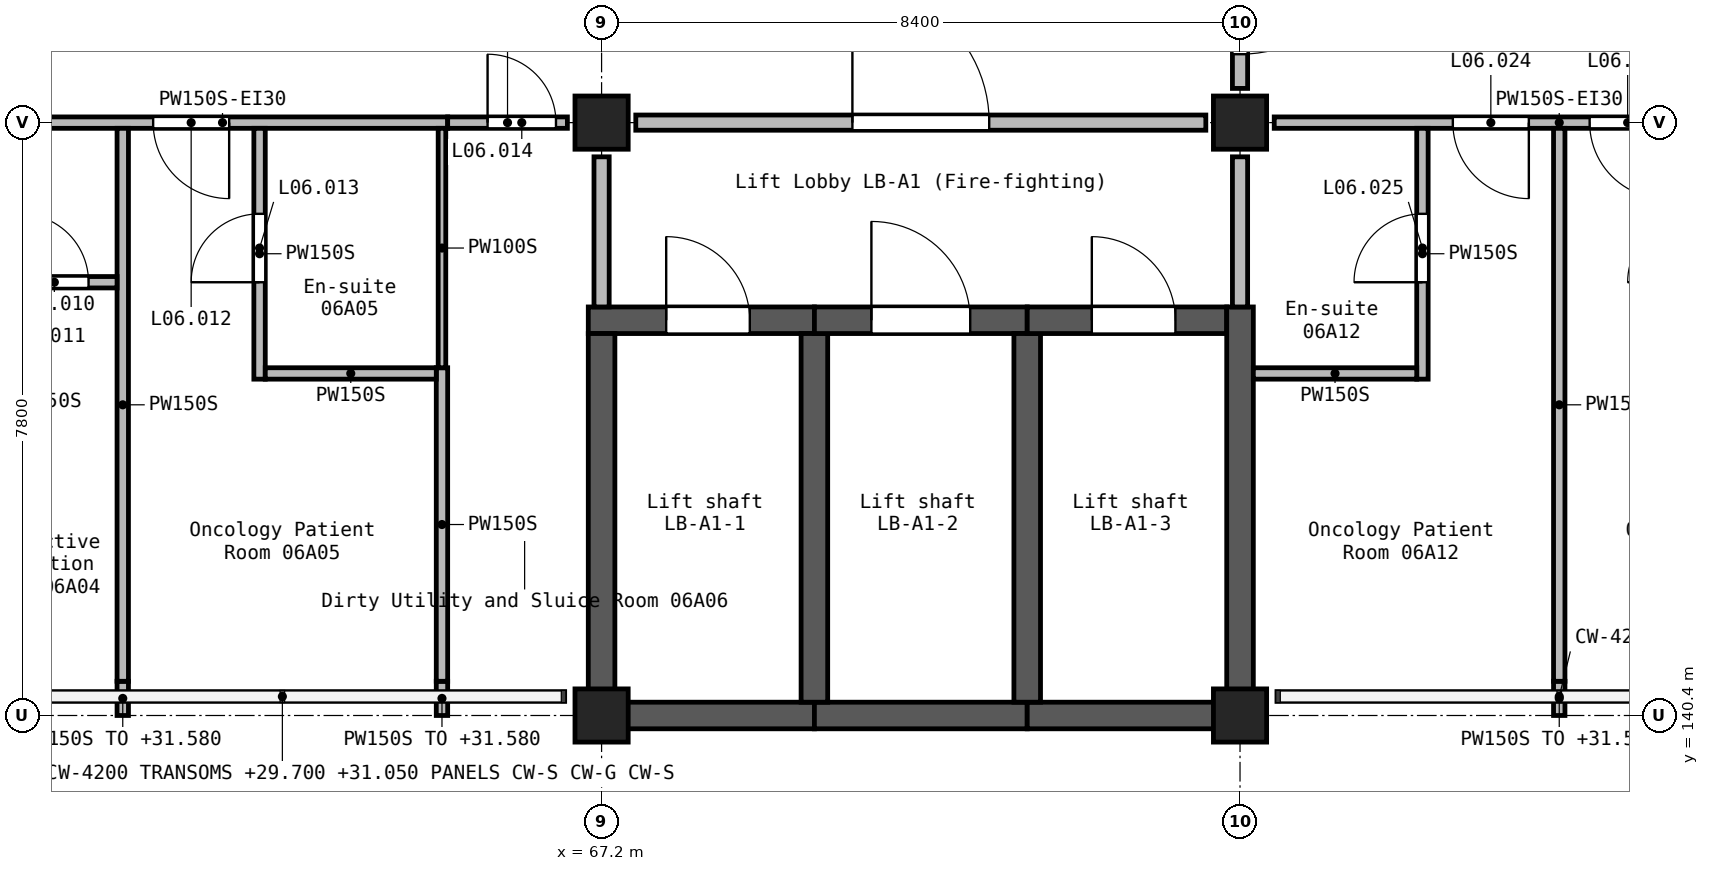
"""IFC4 building model, lengths in metres.
Left out: names, types, materials, properties, quantities, classifications, styles, units other than length and angle.
Written with IfcOpenShell. Run it as: python <this file> out.ifc"""

import sys

from ifc_helpers import new_model, si_unit, direction, frame, frame_2d, origin, origin_2d, place, context, subcontext, project, spatial, rectangle, extrude, element, fill, save


model = new_model("IFC4")
c1 = context("Model", 3, precision=1e-05, world=origin(), true_north=direction((0.0, 1.0)))
c2 = subcontext(c1, "Body", "Model", "MODEL_VIEW")
j1 = project(units=[si_unit("LENGTHUNIT", "METRE"), si_unit("PLANEANGLEUNIT", "RADIAN")], contexts=[c1])
p1 = place(None, origin())
s1 = spatial("IfcSite", under=j1, at=p1, CompositionType="ELEMENT")
p2 = place(p1, origin())
s2 = spatial("IfcBuilding", under=s1, at=p2, CompositionType="ELEMENT")
p3 = place(p2, frame((0.0, 0.0, 28.8)))
s3 = spatial("IfcBuildingStorey", under=s2, at=p3, CompositionType="ELEMENT", Elevation=28.8)
for number, where, z_axis, x_axis in (
    (1, (67.2, 140.4, 0.0), (0.0, 0.0, 1.0), (1.0, 0.0, 0.0)),
    (2, (67.2, 148.2, 0.0), (0.0, 0.0, 1.0), (1.0, 0.0, 0.0)),
    (3, (75.6, 140.4, 0.0), (0.0, 0.0, 1.0), (1.0, 0.0, 0.0)),
    (4, (75.6, 148.2, 0.0), (0.0, 0.0, 1.0), (1.0, 0.0, 0.0)),
):
    element("IfcColumn", number, at=place(p3, frame(where, z_axis=z_axis, x_axis=x_axis)), inside=s3, PredefinedType="COLUMN", context=c2, shape_type="SweptSolid", body=[
        extrude(rectangle(XDim=0.7, YDim=0.7, at=origin_2d()), origin(), (0.0, 0.0, 1.0), 3.9),
    ])
p4 = place(p3, frame((67.025, 145.6, 0.0), z_axis=(0.0, 0.0, 1.0), x_axis=(1.0, 0.0, 0.0)))
e5 = element("IfcWall", 5, at=p4, inside=s3, PredefinedType="SHEAR", context=c2, shape_type="SweptSolid", body=[
    extrude(rectangle(XDim=2.975, YDim=0.35, at=frame_2d((1.488, 0.0))), origin(), (0.0, 0.0, 1.0), 3.9),
])
p5 = place(p4, frame((1.025, 0.0, 0.0)))
e6 = element("IfcOpeningElement", 6, at=p5, cuts=e5, PredefinedType="OPENING", context=c2, shape_type="SweptSolid", body=[
    extrude(rectangle(XDim=1.1, YDim=2.1, at=frame_2d((0.55, 1.05))), frame((0.0, 0.185, 0.0), z_axis=(0.0, -1.0, 0.0), x_axis=(1.0, 0.0, 0.0)), (0.0, 0.0, 1.0), 0.37),
])
p6 = place(p3, frame((67.2, 140.225, 0.0), z_axis=(0.0, 0.0, 1.0), x_axis=(0.0, 1.0, 0.0)))
e7 = element("IfcWall", 7, at=p6, inside=s3, PredefinedType="SHEAR", context=c2, shape_type="SweptSolid", body=[
    extrude(rectangle(XDim=5.2, YDim=0.35, at=frame_2d((2.6, 0.0))), origin(), (0.0, 0.0, 1.0), 3.9),
])
p7 = place(p3, frame((67.375, 140.4, 0.0), z_axis=(0.0, 0.0, 1.0), x_axis=(1.0, 0.0, 0.0)))
e8 = element("IfcWall", 8, at=p7, inside=s3, PredefinedType="SHEAR", context=c2, shape_type="SweptSolid", body=[
    extrude(rectangle(XDim=2.625, YDim=0.35, at=frame_2d((1.312, 0.0))), origin(), (0.0, 0.0, 1.0), 3.9),
])
p8 = place(p3, frame((70.0, 140.4, 0.0), z_axis=(0.0, 0.0, 1.0), x_axis=(1.0, 0.0, 0.0)))
e9 = element("IfcWall", 9, at=p8, inside=s3, PredefinedType="SHEAR", context=c2, shape_type="SweptSolid", body=[
    extrude(rectangle(XDim=2.8, YDim=0.35, at=frame_2d((1.4, 0.0))), origin(), (0.0, 0.0, 1.0), 3.9),
])
p9 = place(p3, frame((70.0, 140.575, 0.0), z_axis=(0.0, 0.0, 1.0), x_axis=(0.0, 1.0, 0.0)))
e10 = element("IfcWall", 10, at=p9, inside=s3, PredefinedType="SHEAR", context=c2, shape_type="SweptSolid", body=[
    extrude(rectangle(XDim=4.85, YDim=0.35, at=frame_2d((2.425, 0.0))), origin(), (0.0, 0.0, 1.0), 3.9),
])
p10 = place(p3, frame((70.0, 145.6, 0.0), z_axis=(0.0, 0.0, 1.0), x_axis=(1.0, 0.0, 0.0)))
e11 = element("IfcWall", 11, at=p10, inside=s3, PredefinedType="SHEAR", context=c2, shape_type="SweptSolid", body=[
    extrude(rectangle(XDim=2.8, YDim=0.35, at=frame_2d((1.4, 0.0))), origin(), (0.0, 0.0, 1.0), 3.9),
])
p11 = place(p10, frame((0.75, 0.0, 0.0)))
e12 = element("IfcOpeningElement", 12, at=p11, cuts=e11, PredefinedType="OPENING", context=c2, shape_type="SweptSolid", body=[
    extrude(rectangle(XDim=1.3, YDim=2.1, at=frame_2d((0.65, 1.05))), frame((0.0, 0.185, 0.0), z_axis=(0.0, -1.0, 0.0), x_axis=(1.0, 0.0, 0.0)), (0.0, 0.0, 1.0), 0.37),
])
p12 = place(p3, frame((72.8, 140.4, 0.0), z_axis=(0.0, 0.0, 1.0), x_axis=(1.0, 0.0, 0.0)))
e13 = element("IfcWall", 13, at=p12, inside=s3, PredefinedType="SHEAR", context=c2, shape_type="SweptSolid", body=[
    extrude(rectangle(XDim=2.625, YDim=0.35, at=frame_2d((1.312, 0.0))), origin(), (0.0, 0.0, 1.0), 3.9),
])
p13 = place(p3, frame((72.8, 140.575, 0.0), z_axis=(0.0, 0.0, 1.0), x_axis=(0.0, 1.0, 0.0)))
e14 = element("IfcWall", 14, at=p13, inside=s3, PredefinedType="SHEAR", context=c2, shape_type="SweptSolid", body=[
    extrude(rectangle(XDim=4.85, YDim=0.35, at=frame_2d((2.425, 0.0))), origin(), (0.0, 0.0, 1.0), 3.9),
])
p14 = place(p3, frame((72.8, 145.6, 0.0), z_axis=(0.0, 0.0, 1.0), x_axis=(1.0, 0.0, 0.0)))
e15 = element("IfcWall", 15, at=p14, inside=s3, PredefinedType="SHEAR", context=c2, shape_type="SweptSolid", body=[
    extrude(rectangle(XDim=2.625, YDim=0.35, at=frame_2d((1.312, 0.0))), origin(), (0.0, 0.0, 1.0), 3.9),
])
p15 = place(p14, frame((0.85, 0.0, 0.0)))
e16 = element("IfcOpeningElement", 16, at=p15, cuts=e15, PredefinedType="OPENING", context=c2, shape_type="SweptSolid", body=[
    extrude(rectangle(XDim=1.1, YDim=2.1, at=frame_2d((0.55, 1.05))), frame((0.0, 0.185, 0.0), z_axis=(0.0, -1.0, 0.0), x_axis=(1.0, 0.0, 0.0)), (0.0, 0.0, 1.0), 0.37),
])
p16 = place(p3, frame((75.6, 140.225, 0.0), z_axis=(0.0, 0.0, 1.0), x_axis=(0.0, 1.0, 0.0)))
e17 = element("IfcWall", 17, at=p16, inside=s3, PredefinedType="SHEAR", context=c2, shape_type="SweptSolid", body=[
    extrude(rectangle(XDim=5.55, YDim=0.35, at=frame_2d((2.775, 0.0))), origin(), (0.0, 0.0, 1.0), 3.9),
])
p17 = place(p3, frame((75.6, 151.35, 0.0), z_axis=(0.0, 0.0, 1.0), x_axis=(0.0, -1.0, 0.0)))
e18 = element("IfcWall", 18, at=p17, inside=s3, PredefinedType="SOLIDWALL", context=c2, shape_type="SweptSolid", body=[
    extrude(rectangle(XDim=2.7, YDim=0.2, at=frame_2d((1.35, 0.0))), origin(), (0.0, 0.0, 1.0), 3.6),
])
p18 = place(p17, frame((0.45, 0.0, 0.0)))
e19 = element("IfcOpeningElement", 19, at=p18, cuts=e18, PredefinedType="OPENING", context=c2, shape_type="SweptSolid", body=[
    extrude(rectangle(XDim=1.8, YDim=2.1, at=frame_2d((0.9, 1.05))), frame((0.0, 0.11, 0.0), z_axis=(0.0, -1.0, 0.0), x_axis=(1.0, 0.0, 0.0)), (0.0, 0.0, 1.0), 0.22),
])
p19 = place(p3, frame((75.6, 147.75, 0.0), z_axis=(0.0, 0.0, 1.0), x_axis=(0.0, -1.0, 0.0)))
e20 = element("IfcWall", 20, at=p19, inside=s3, PredefinedType="SOLIDWALL", context=c2, shape_type="SweptSolid", body=[
    extrude(rectangle(XDim=1.975, YDim=0.2, at=frame_2d((0.988, 0.0))), origin(), (0.0, 0.0, 1.0), 3.6),
])
p20 = place(p3, frame((67.65, 148.2, 0.0), z_axis=(0.0, 0.0, 1.0), x_axis=(1.0, 0.0, 0.0)))
e21 = element("IfcWall", 21, at=p20, inside=s3, PredefinedType="SOLIDWALL", context=c2, shape_type="SweptSolid", body=[
    extrude(rectangle(XDim=7.5, YDim=0.2, at=frame_2d((3.75, 0.0))), origin(), (0.0, 0.0, 1.0), 3.6),
])
p21 = place(p20, frame((2.85, 0.0, 0.0)))
e22 = element("IfcOpeningElement", 22, at=p21, cuts=e21, PredefinedType="OPENING", context=c2, shape_type="SweptSolid", body=[
    extrude(rectangle(XDim=1.8, YDim=2.1, at=frame_2d((0.9, 1.05))), frame((0.0, 0.11, 0.0), z_axis=(0.0, -1.0, 0.0), x_axis=(1.0, 0.0, 0.0)), (0.0, 0.0, 1.0), 0.22),
])
p22 = place(p3, frame((67.2, 145.775, 0.0), z_axis=(0.0, 0.0, 1.0), x_axis=(0.0, 1.0, 0.0)))
e23 = element("IfcWall", 23, at=p22, inside=s3, PredefinedType="SOLIDWALL", context=c2, shape_type="SweptSolid", body=[
    extrude(rectangle(XDim=1.975, YDim=0.2, at=frame_2d((0.988, 0.0))), origin(), (0.0, 0.0, 1.0), 3.6),
])
p23 = place(p3, frame((83.55, 148.2, 0.0), z_axis=(0.0, 0.0, 1.0), x_axis=(-1.0, 0.0, 0.0)))
e24 = element("IfcWall", 24, at=p23, inside=s3, PredefinedType="PARTITIONING", context=c2, shape_type="SweptSolid", body=[
    extrude(rectangle(XDim=7.5, YDim=0.15, at=frame_2d((3.75, 0.0))), origin(), (0.0, 0.0, 1.0), 3.6),
])
p24 = place(p23, frame((4.15, 0.0, 0.0)))
e25 = element("IfcOpeningElement", 25, at=p24, cuts=e24, PredefinedType="OPENING", context=c2, shape_type="SweptSolid", body=[
    extrude(rectangle(XDim=1.0, YDim=2.1, at=frame_2d((0.5, 1.05))), frame((0.0, 0.085, 0.0), z_axis=(0.0, -1.0, 0.0), x_axis=(1.0, 0.0, 0.0)), (0.0, 0.0, 1.0), 0.17),
])
p25 = place(p23, frame((2.35, 0.0, 0.0)))
e26 = element("IfcOpeningElement", 26, at=p25, cuts=e24, PredefinedType="OPENING", context=c2, shape_type="SweptSolid", body=[
    extrude(rectangle(XDim=1.0, YDim=2.1, at=frame_2d((0.5, 1.05))), frame((0.0, 0.085, 0.0), z_axis=(0.0, -1.0, 0.0), x_axis=(1.0, 0.0, 0.0)), (0.0, 0.0, 1.0), 0.17),
])
p26 = place(p3, frame((65.175, 148.2, 0.0), z_axis=(0.0, 0.0, 1.0), x_axis=(-1.0, 0.0, 0.0)))
e27 = element("IfcWall", 27, at=p26, inside=s3, PredefinedType="PARTITIONING", context=c2, shape_type="SweptSolid", body=[
    extrude(rectangle(XDim=5.925, YDim=0.15, at=frame_2d((2.962, 0.0))), origin(), (0.0, 0.0, 1.0), 3.6),
])
p27 = place(p26, frame((2.875, 0.0, 0.0)))
e28 = element("IfcOpeningElement", 28, at=p27, cuts=e27, PredefinedType="OPENING", context=c2, shape_type="SweptSolid", body=[
    extrude(rectangle(XDim=1.0, YDim=2.1, at=frame_2d((0.5, 1.05))), frame((0.0, 0.085, 0.0), z_axis=(0.0, -1.0, 0.0), x_axis=(1.0, 0.0, 0.0)), (0.0, 0.0, 1.0), 0.17),
])
p28 = place(p3, frame((65.175, 148.2, 0.0), z_axis=(0.0, 0.0, 1.0), x_axis=(1.0, 0.0, 0.0)))
e29 = element("IfcWall", 29, at=p28, inside=s3, PredefinedType="PARTITIONING", context=c2, shape_type="SweptSolid", body=[
    extrude(rectangle(XDim=1.575, YDim=0.15, at=frame_2d((0.788, 0.0))), origin(), (0.0, 0.0, 1.0), 3.6),
])
p29 = place(p28, frame((0.525, 0.0, 0.0)))
e30 = element("IfcOpeningElement", 30, at=p29, cuts=e29, PredefinedType="OPENING", context=c2, shape_type="SweptSolid", body=[
    extrude(rectangle(XDim=0.9, YDim=2.1, at=frame_2d((0.45, 1.05))), frame((0.0, 0.085, 0.0), z_axis=(0.0, -1.0, 0.0), x_axis=(1.0, 0.0, 0.0)), (0.0, 0.0, 1.0), 0.17),
])
p30 = place(p3, frame((60.9, 140.4, 0.0), z_axis=(0.0, 0.0, 1.0), x_axis=(0.0, 1.0, 0.0)))
e31 = element("IfcWall", 31, at=p30, inside=s3, PredefinedType="PARTITIONING", context=c2, shape_type="SweptSolid", body=[
    extrude(rectangle(XDim=0.45, YDim=0.15, at=frame_2d((0.225, 0.0))), origin(), (0.0, 0.0, 1.0), 2.78),
])
p31 = place(p3, frame((60.9, 140.85, 0.0), z_axis=(0.0, 0.0, 1.0), x_axis=(0.0, 1.0, 0.0)))
e32 = element("IfcWall", 32, at=p31, inside=s3, PredefinedType="PARTITIONING", context=c2, shape_type="SweptSolid", body=[
    extrude(rectangle(XDim=7.275, YDim=0.15, at=frame_2d((3.637, 0.0))), origin(), (0.0, 0.0, 1.0), 3.6),
])
p32 = place(p3, frame((79.8, 140.4, 0.0), z_axis=(0.0, 0.0, 1.0), x_axis=(0.0, 1.0, 0.0)))
e33 = element("IfcWall", 33, at=p32, inside=s3, PredefinedType="PARTITIONING", context=c2, shape_type="SweptSolid", body=[
    extrude(rectangle(XDim=0.45, YDim=0.15, at=frame_2d((0.225, 0.0))), origin(), (0.0, 0.0, 1.0), 2.78),
])
p33 = place(p3, frame((79.8, 140.85, 0.0), z_axis=(0.0, 0.0, 1.0), x_axis=(0.0, 1.0, 0.0)))
e34 = element("IfcWall", 34, at=p33, inside=s3, PredefinedType="PARTITIONING", context=c2, shape_type="SweptSolid", body=[
    extrude(rectangle(XDim=7.275, YDim=0.15, at=frame_2d((3.637, 0.0))), origin(), (0.0, 0.0, 1.0), 3.6),
])
p34 = place(p3, frame((65.1, 140.4, 0.0), z_axis=(0.0, 0.0, 1.0), x_axis=(0.0, 1.0, 0.0)))
e35 = element("IfcWall", 35, at=p34, inside=s3, PredefinedType="PARTITIONING", context=c2, shape_type="SweptSolid", body=[
    extrude(rectangle(XDim=0.45, YDim=0.15, at=frame_2d((0.225, 0.0))), origin(), (0.0, 0.0, 1.0), 2.78),
])
p35 = place(p3, frame((65.1, 140.85, 0.0), z_axis=(0.0, 0.0, 1.0), x_axis=(0.0, 1.0, 0.0)))
e36 = element("IfcWall", 36, at=p35, inside=s3, PredefinedType="PARTITIONING", context=c2, shape_type="SweptSolid", body=[
    extrude(rectangle(XDim=4.125, YDim=0.15, at=frame_2d((2.062, 0.0))), origin(), (0.0, 0.0, 1.0), 3.6),
])
p36 = place(p3, frame((56.625, 146.1, 0.0), z_axis=(0.0, 0.0, 1.0), x_axis=(1.0, 0.0, 0.0)))
e37 = element("IfcWall", 37, at=p36, inside=s3, PredefinedType="PARTITIONING", context=c2, shape_type="SweptSolid", body=[
    extrude(rectangle(XDim=4.2, YDim=0.15, at=frame_2d((2.1, 0.0))), origin(), (0.0, 0.0, 1.0), 3.6),
])
p37 = place(p36, frame((2.925, 0.0, 0.0)))
e38 = element("IfcOpeningElement", 38, at=p37, cuts=e37, PredefinedType="OPENING", context=c2, shape_type="SweptSolid", body=[
    extrude(rectangle(XDim=0.9, YDim=2.1, at=frame_2d((0.45, 1.05))), frame((0.0, 0.085, 0.0), z_axis=(0.0, -1.0, 0.0), x_axis=(1.0, 0.0, 0.0)), (0.0, 0.0, 1.0), 0.17),
])
p38 = place(p3, frame((62.7, 144.825, 0.0), z_axis=(0.0, 0.0, 1.0), x_axis=(0.0, 1.0, 0.0)))
e39 = element("IfcWall", 39, at=p38, inside=s3, PredefinedType="PARTITIONING", context=c2, shape_type="SweptSolid", body=[
    extrude(rectangle(XDim=3.3, YDim=0.15, at=frame_2d((1.65, 0.0))), origin(), (0.0, 0.0, 1.0), 3.6),
])
p39 = place(p38, frame((1.275, 0.0, 0.0)))
e40 = element("IfcOpeningElement", 40, at=p39, cuts=e39, PredefinedType="OPENING", context=c2, shape_type="SweptSolid", body=[
    extrude(rectangle(XDim=0.9, YDim=2.1, at=frame_2d((0.45, 1.05))), frame((0.0, 0.085, 0.0), z_axis=(0.0, -1.0, 0.0), x_axis=(1.0, 0.0, 0.0)), (0.0, 0.0, 1.0), 0.17),
])
p40 = place(p3, frame((78.0, 144.825, 0.0), z_axis=(0.0, 0.0, 1.0), x_axis=(0.0, 1.0, 0.0)))
e41 = element("IfcWall", 41, at=p40, inside=s3, PredefinedType="PARTITIONING", context=c2, shape_type="SweptSolid", body=[
    extrude(rectangle(XDim=3.3, YDim=0.15, at=frame_2d((1.65, 0.0))), origin(), (0.0, 0.0, 1.0), 3.6),
])
p41 = place(p40, frame((1.275, 0.0, 0.0)))
e42 = element("IfcOpeningElement", 42, at=p41, cuts=e41, PredefinedType="OPENING", context=c2, shape_type="SweptSolid", body=[
    extrude(rectangle(XDim=0.9, YDim=2.1, at=frame_2d((0.45, 1.05))), frame((0.0, 0.085, 0.0), z_axis=(0.0, -1.0, 0.0), x_axis=(1.0, 0.0, 0.0)), (0.0, 0.0, 1.0), 0.17),
])
p42 = place(p3, frame((75.775, 144.9, 0.0), z_axis=(0.0, 0.0, 1.0), x_axis=(1.0, 0.0, 0.0)))
e43 = element("IfcWall", 43, at=p42, inside=s3, PredefinedType="PARTITIONING", context=c2, shape_type="SweptSolid", body=[
    extrude(rectangle(XDim=2.15, YDim=0.15, at=frame_2d((1.075, 0.0))), origin(), (0.0, 0.0, 1.0), 3.6),
])
p43 = place(p3, frame((62.775, 144.9, 0.0), z_axis=(0.0, 0.0, 1.0), x_axis=(1.0, 0.0, 0.0)))
e44 = element("IfcWall", 44, at=p43, inside=s3, PredefinedType="PARTITIONING", context=c2, shape_type="SweptSolid", body=[
    extrude(rectangle(XDim=2.25, YDim=0.15, at=frame_2d((1.125, 0.0))), origin(), (0.0, 0.0, 1.0), 3.6),
])
p44 = place(p3, frame((65.1, 144.975, 0.0), z_axis=(0.0, 0.0, 1.0), x_axis=(0.0, 1.0, 0.0)))
e45 = element("IfcWall", 45, at=p44, inside=s3, PredefinedType="PARTITIONING", context=c2, shape_type="SweptSolid", body=[
    extrude(rectangle(XDim=3.15, YDim=0.1, at=frame_2d((1.575, 0.0))), origin(), (0.0, 0.0, 1.0), 3.6),
])
p45 = place(p18, origin())
e46 = element("IfcDoor", 46, at=p45, inside=s3, OperationType="DOUBLE_DOOR_SINGLE_SWING", PredefinedType="DOOR", context=c2, shape_type="SweptSolid", body=[
    extrude(rectangle(XDim=1.8, YDim=2.1, at=frame_2d((0.9, 1.05))), frame((0.0, 0.025, 0.0), z_axis=(0.0, -1.0, 0.0), x_axis=(1.0, 0.0, 0.0)), (0.0, 0.0, 1.0), 0.05),
])
fill(e19, e46)
p46 = place(p37, frame((0.9, 0.0, 0.0), z_axis=(0.0, 0.0, 1.0), x_axis=(-1.0, 0.0, 0.0)))
e47 = element("IfcDoor", 47, at=p46, inside=s3, OperationType="SINGLE_SWING_LEFT", PredefinedType="DOOR", context=c2, shape_type="SweptSolid", body=[
    extrude(rectangle(XDim=0.9, YDim=2.1, at=frame_2d((0.45, 1.05))), frame((0.0, 0.025, 0.0), z_axis=(0.0, -1.0, 0.0), x_axis=(1.0, 0.0, 0.0)), (0.0, 0.0, 1.0), 0.05),
])
fill(e38, e47)
p47 = place(p27, origin())
e48 = element("IfcDoor", 48, at=p47, inside=s3, OperationType="SINGLE_SWING_RIGHT", PredefinedType="DOOR", context=c2, shape_type="SweptSolid", body=[
    extrude(rectangle(XDim=1.0, YDim=2.1, at=frame_2d((0.5, 1.05))), frame((0.0, 0.025, 0.0), z_axis=(0.0, -1.0, 0.0), x_axis=(1.0, 0.0, 0.0)), (0.0, 0.0, 1.0), 0.05),
])
fill(e28, e48)
p48 = place(p39, frame((0.9, 0.0, 0.0), z_axis=(0.0, 0.0, 1.0), x_axis=(-1.0, 0.0, 0.0)))
e49 = element("IfcDoor", 49, at=p48, inside=s3, OperationType="SINGLE_SWING_LEFT", PredefinedType="DOOR", context=c2, shape_type="SweptSolid", body=[
    extrude(rectangle(XDim=0.9, YDim=2.1, at=frame_2d((0.45, 1.05))), frame((0.0, 0.025, 0.0), z_axis=(0.0, -1.0, 0.0), x_axis=(1.0, 0.0, 0.0)), (0.0, 0.0, 1.0), 0.05),
])
fill(e40, e49)
p49 = place(p29, frame((0.9, 0.0, 0.0), z_axis=(0.0, 0.0, 1.0), x_axis=(-1.0, 0.0, 0.0)))
e50 = element("IfcDoor", 50, at=p49, inside=s3, OperationType="SINGLE_SWING_LEFT", PredefinedType="DOOR", context=c2, shape_type="SweptSolid", body=[
    extrude(rectangle(XDim=0.9, YDim=2.1, at=frame_2d((0.45, 1.05))), frame((0.0, 0.025, 0.0), z_axis=(0.0, -1.0, 0.0), x_axis=(1.0, 0.0, 0.0)), (0.0, 0.0, 1.0), 0.05),
])
fill(e30, e50)
p50 = place(p24, origin())
e51 = element("IfcDoor", 51, at=p50, inside=s3, OperationType="SINGLE_SWING_RIGHT", PredefinedType="DOOR", context=c2, shape_type="SweptSolid", body=[
    extrude(rectangle(XDim=1.0, YDim=2.1, at=frame_2d((0.5, 1.05))), frame((0.0, 0.025, 0.0), z_axis=(0.0, -1.0, 0.0), x_axis=(1.0, 0.0, 0.0)), (0.0, 0.0, 1.0), 0.05),
])
fill(e25, e51)
p51 = place(p41, origin())
e52 = element("IfcDoor", 52, at=p51, inside=s3, OperationType="SINGLE_SWING_RIGHT", PredefinedType="DOOR", context=c2, shape_type="SweptSolid", body=[
    extrude(rectangle(XDim=0.9, YDim=2.1, at=frame_2d((0.45, 1.05))), frame((0.0, 0.025, 0.0), z_axis=(0.0, -1.0, 0.0), x_axis=(1.0, 0.0, 0.0)), (0.0, 0.0, 1.0), 0.05),
])
fill(e42, e52)
p52 = place(p25, origin())
e53 = element("IfcDoor", 53, at=p52, inside=s3, OperationType="SINGLE_SWING_LEFT", PredefinedType="DOOR", context=c2, shape_type="SweptSolid", body=[
    extrude(rectangle(XDim=1.0, YDim=2.1, at=frame_2d((0.5, 1.05))), frame((0.0, 0.025, 0.0), z_axis=(0.0, -1.0, 0.0), x_axis=(1.0, 0.0, 0.0)), (0.0, 0.0, 1.0), 0.05),
])
fill(e26, e53)
p53 = place(p21, frame((1.8, 0.0, 0.0), z_axis=(0.0, 0.0, 1.0), x_axis=(-1.0, 0.0, 0.0)))
e54 = element("IfcDoor", 54, at=p53, inside=s3, OperationType="DOUBLE_DOOR_SINGLE_SWING", PredefinedType="DOOR", context=c2, shape_type="SweptSolid", body=[
    extrude(rectangle(XDim=1.8, YDim=2.1, at=frame_2d((0.9, 1.05))), frame((0.0, 0.025, 0.0), z_axis=(0.0, -1.0, 0.0), x_axis=(1.0, 0.0, 0.0)), (0.0, 0.0, 1.0), 0.05),
])
fill(e22, e54)
p54 = place(p5, origin())
e55 = element("IfcDoor", 55, at=p54, inside=s3, OperationType="DOUBLE_DOOR_SLIDING", PredefinedType="DOOR", context=c2, shape_type="SweptSolid", body=[
    extrude(rectangle(XDim=1.1, YDim=2.1, at=frame_2d((0.55, 1.05))), frame((0.0, 0.025, 0.0), z_axis=(0.0, -1.0, 0.0), x_axis=(1.0, 0.0, 0.0)), (0.0, 0.0, 1.0), 0.05),
])
fill(e6, e55)
p55 = place(p11, origin())
e56 = element("IfcDoor", 56, at=p55, inside=s3, OperationType="DOUBLE_DOOR_SLIDING", PredefinedType="DOOR", context=c2, shape_type="SweptSolid", body=[
    extrude(rectangle(XDim=1.3, YDim=2.1, at=frame_2d((0.65, 1.05))), frame((0.0, 0.025, 0.0), z_axis=(0.0, -1.0, 0.0), x_axis=(1.0, 0.0, 0.0)), (0.0, 0.0, 1.0), 0.05),
])
fill(e12, e56)
p56 = place(p15, origin())
e57 = element("IfcDoor", 57, at=p56, inside=s3, OperationType="DOUBLE_DOOR_SLIDING", PredefinedType="DOOR", context=c2, shape_type="SweptSolid", body=[
    extrude(rectangle(XDim=1.1, YDim=2.1, at=frame_2d((0.55, 1.05))), frame((0.0, 0.025, 0.0), z_axis=(0.0, -1.0, 0.0), x_axis=(1.0, 0.0, 0.0)), (0.0, 0.0, 1.0), 0.05),
])
fill(e16, e57)
save(model, sys.argv[1])
